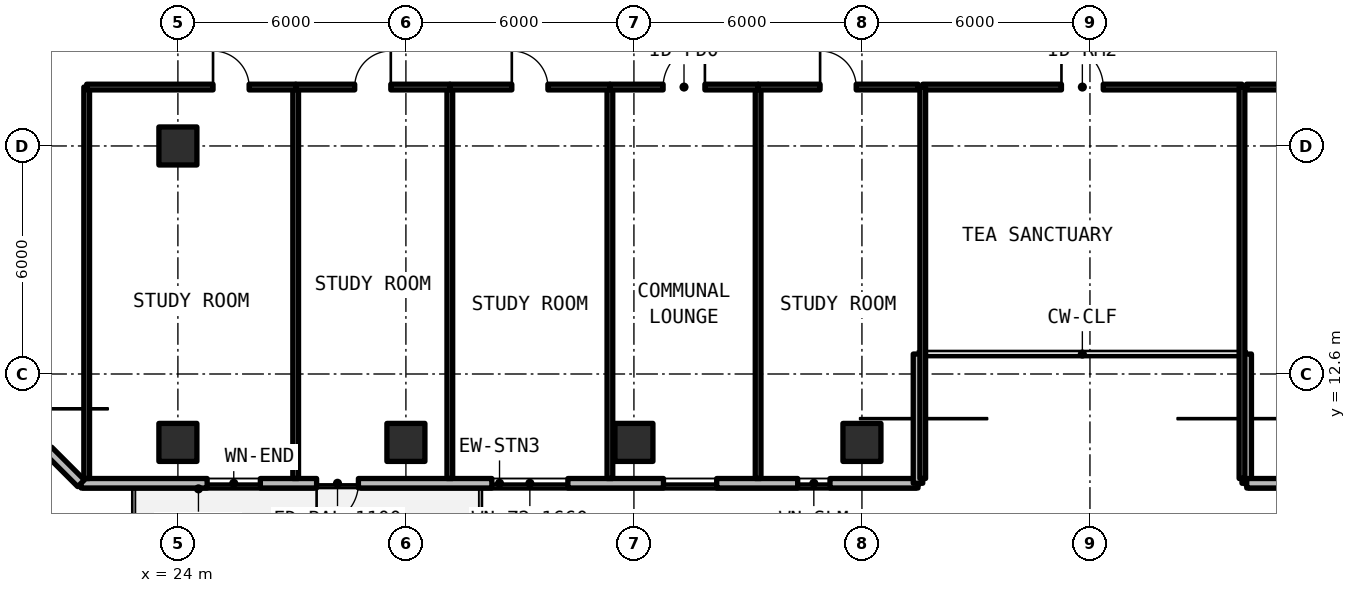
"""IFC4 building model, lengths in metres.
Left out: names, types, materials, properties, quantities, classifications, styles, units other than length and angle.
Written with IfcOpenShell. Run it as: python <this file> out.ifc"""

import sys

from ifc_helpers import new_model, si_unit, direction, frame, frame_2d, origin, origin_2d, place, context, subcontext, project, spatial, rectangle, extrude, element, fill, save


model = new_model("IFC4")
c1 = context("Model", 3, precision=1e-05, world=origin(), true_north=direction((0.0, 1.0)))
c2 = subcontext(c1, "Body", "Model", "MODEL_VIEW")
j1 = project(units=[si_unit("LENGTHUNIT", "METRE"), si_unit("PLANEANGLEUNIT", "RADIAN")], contexts=[c1])
p1 = place(None, origin())
s1 = spatial("IfcSite", under=j1, at=p1, CompositionType="ELEMENT")
p2 = place(p1, origin())
s2 = spatial("IfcBuilding", under=s1, at=p2, CompositionType="ELEMENT")
p3 = place(p2, frame((0.0, 0.0, 98.67)))
s3 = spatial("IfcBuildingStorey", under=s2, at=p3, CompositionType="ELEMENT", Elevation=98.67)
for number, where, z_axis, x_axis in (
    (1, (24.0, 18.6, 0.0), (0.0, 0.0, 1.0), (1.0, 0.0, 0.0)),
    (2, (24.0, 10.8, 0.0), (0.0, 0.0, 1.0), (1.0, 0.0, 0.0)),
    (3, (30.0, 10.8, 0.0), (0.0, 0.0, 1.0), (1.0, 0.0, 0.0)),
    (4, (36.0, 10.8, 0.0), (0.0, 0.0, 1.0), (1.0, 0.0, 0.0)),
    (5, (42.0, 10.8, 0.0), (0.0, 0.0, 1.0), (1.0, 0.0, 0.0)),
):
    element("IfcColumn", number, at=place(p3, frame(where, z_axis=z_axis, x_axis=x_axis)), inside=s3, PredefinedType="COLUMN", context=c2, shape_type="SweptSolid", body=[
        extrude(rectangle(XDim=1.0, YDim=1.0, at=origin_2d()), origin(), (0.0, 0.0, 1.0), 3.3),
    ])
p4 = place(p3, frame((21.452, 9.725, 0.0), z_axis=(0.0, 0.0, 1.0), x_axis=(1.0, 0.0, 0.0)))
e6 = element("IfcWall", 6, at=p4, inside=s3, PredefinedType="SOLIDWALL", context=c2, shape_type="SweptSolid", body=[
    extrude(rectangle(XDim=22.023, YDim=0.25, at=frame_2d((11.012, 0.0))), origin(), (0.0, 0.0, 1.0), 3.08),
])
p5 = place(p4, frame((6.198, 0.0, 0.0)))
e7 = element("IfcOpeningElement", 7, at=p5, cuts=e6, PredefinedType="OPENING", context=c2, shape_type="SweptSolid", body=[
    extrude(rectangle(XDim=1.1, YDim=2.15, at=frame_2d((0.55, 1.075))), frame((0.0, 0.135, 0.0), z_axis=(0.0, -1.0, 0.0), x_axis=(1.0, 0.0, 0.0)), (0.0, 0.0, 1.0), 0.27),
])
p6 = place(p4, frame((3.318, 0.0, 0.78)))
e8 = element("IfcOpeningElement", 8, at=p6, cuts=e6, PredefinedType="OPENING", context=c2, shape_type="SweptSolid", body=[
    extrude(rectangle(XDim=1.4, YDim=1.65, at=frame_2d((0.7, 0.825))), frame((0.0, 0.135, 0.0), z_axis=(0.0, -1.0, 0.0), x_axis=(1.0, 0.0, 0.0)), (0.0, 0.0, 1.0), 0.27),
])
p7 = place(p4, frame((10.81, 0.0, 0.78)))
e9 = element("IfcOpeningElement", 9, at=p7, cuts=e6, PredefinedType="OPENING", context=c2, shape_type="SweptSolid", body=[
    extrude(rectangle(XDim=2.0, YDim=1.66, at=frame_2d((1.0, 0.83))), frame((0.0, 0.135, 0.0), z_axis=(0.0, -1.0, 0.0), x_axis=(1.0, 0.0, 0.0)), (0.0, 0.0, 1.0), 0.27),
])
p8 = place(p4, frame((15.326, 0.0, 0.78)))
e10 = element("IfcOpeningElement", 10, at=p8, cuts=e6, PredefinedType="OPENING", context=c2, shape_type="SweptSolid", body=[
    extrude(rectangle(XDim=1.4, YDim=1.65, at=frame_2d((0.7, 0.825))), frame((0.0, 0.135, 0.0), z_axis=(0.0, -1.0, 0.0), x_axis=(1.0, 0.0, 0.0)), (0.0, 0.0, 1.0), 0.27),
])
p9 = place(p4, frame((18.857, 0.0, 0.78)))
e11 = element("IfcOpeningElement", 11, at=p9, cuts=e6, PredefinedType="OPENING", context=c2, shape_type="SweptSolid", body=[
    extrude(rectangle(XDim=0.85, YDim=1.65, at=frame_2d((0.425, 0.825))), frame((0.0, 0.135, 0.0), z_axis=(0.0, -1.0, 0.0), x_axis=(1.0, 0.0, 0.0)), (0.0, 0.0, 1.0), 0.27),
])
for number, where, z_axis, x_axis in (
    (12, (43.475, 9.725, 0.0), (0.0, 0.0, 1.0), (0.0, 1.0, 0.0)),
    (13, (52.125, 13.125, 0.0), (0.0, 0.0, 1.0), (0.0, -1.0, 0.0)),
):
    element("IfcWall", number, at=place(p3, frame(where, z_axis=z_axis, x_axis=x_axis)), inside=s3, PredefinedType="SOLIDWALL", context=c2, shape_type="SweptSolid", body=[
        extrude(rectangle(XDim=3.4, YDim=0.25, at=frame_2d((1.7, 0.0))), origin(), (0.0, 0.0, 1.0), 3.08),
    ])
p10 = place(p3, frame((52.125, 9.725, 0.0), z_axis=(0.0, 0.0, 1.0), x_axis=(1.0, 0.0, 0.0)))
e14 = element("IfcWall", 14, at=p10, inside=s3, PredefinedType="SOLIDWALL", context=c2, shape_type="SweptSolid", body=[
    extrude(rectangle(XDim=44.023, YDim=0.25, at=frame_2d((22.012, 0.0))), origin(), (0.0, 0.0, 1.0), 3.08),
])
p11 = place(p10, frame((10.525, 0.0, 0.0)))
e15 = element("IfcOpeningElement", 15, at=p11, cuts=e14, PredefinedType="OPENING", context=c2, shape_type="SweptSolid", body=[
    extrude(rectangle(XDim=1.1, YDim=2.15, at=frame_2d((0.55, 1.075))), frame((0.0, 0.135, 0.0), z_axis=(0.0, -1.0, 0.0), x_axis=(1.0, 0.0, 0.0)), (0.0, 0.0, 1.0), 0.27),
])
p12 = place(p10, frame((22.125, 0.0, 0.0)))
e16 = element("IfcOpeningElement", 16, at=p12, cuts=e14, PredefinedType="OPENING", context=c2, shape_type="SweptSolid", body=[
    extrude(rectangle(XDim=1.1, YDim=2.15, at=frame_2d((0.55, 1.075))), frame((0.0, 0.135, 0.0), z_axis=(0.0, -1.0, 0.0), x_axis=(1.0, 0.0, 0.0)), (0.0, 0.0, 1.0), 0.27),
])
p13 = place(p10, frame((34.475, 0.0, 0.0)))
e17 = element("IfcOpeningElement", 17, at=p13, cuts=e14, PredefinedType="OPENING", context=c2, shape_type="SweptSolid", body=[
    extrude(rectangle(XDim=1.1, YDim=2.15, at=frame_2d((0.55, 1.075))), frame((0.0, 0.135, 0.0), z_axis=(0.0, -1.0, 0.0), x_axis=(1.0, 0.0, 0.0)), (0.0, 0.0, 1.0), 0.27),
])
p14 = place(p10, frame((2.669, 0.0, 0.78)))
e18 = element("IfcOpeningElement", 18, at=p14, cuts=e14, PredefinedType="OPENING", context=c2, shape_type="SweptSolid", body=[
    extrude(rectangle(XDim=2.0, YDim=1.66, at=frame_2d((1.0, 0.83))), frame((0.0, 0.135, 0.0), z_axis=(0.0, -1.0, 0.0), x_axis=(1.0, 0.0, 0.0)), (0.0, 0.0, 1.0), 0.27),
])
p15 = place(p10, frame((8.314, 0.0, 0.78)))
e19 = element("IfcOpeningElement", 19, at=p15, cuts=e14, PredefinedType="OPENING", context=c2, shape_type="SweptSolid", body=[
    extrude(rectangle(XDim=0.85, YDim=1.65, at=frame_2d((0.425, 0.825))), frame((0.0, 0.135, 0.0), z_axis=(0.0, -1.0, 0.0), x_axis=(1.0, 0.0, 0.0)), (0.0, 0.0, 1.0), 0.27),
])
p16 = place(p10, frame((15.009, 0.0, 0.78)))
e20 = element("IfcOpeningElement", 20, at=p16, cuts=e14, PredefinedType="OPENING", context=c2, shape_type="SweptSolid", body=[
    extrude(rectangle(XDim=0.85, YDim=1.65, at=frame_2d((0.425, 0.825))), frame((0.0, 0.135, 0.0), z_axis=(0.0, -1.0, 0.0), x_axis=(1.0, 0.0, 0.0)), (0.0, 0.0, 1.0), 0.27),
])
p17 = place(p10, frame((17.708, 0.0, 0.78)))
e21 = element("IfcOpeningElement", 21, at=p17, cuts=e14, PredefinedType="OPENING", context=c2, shape_type="SweptSolid", body=[
    extrude(rectangle(XDim=1.4, YDim=1.65, at=frame_2d((0.7, 0.825))), frame((0.0, 0.135, 0.0), z_axis=(0.0, -1.0, 0.0), x_axis=(1.0, 0.0, 0.0)), (0.0, 0.0, 1.0), 0.27),
])
p18 = place(p10, frame((26.714, 0.0, 0.78)))
e22 = element("IfcOpeningElement", 22, at=p18, cuts=e14, PredefinedType="OPENING", context=c2, shape_type="SweptSolid", body=[
    extrude(rectangle(XDim=1.4, YDim=1.65, at=frame_2d((0.7, 0.825))), frame((0.0, 0.135, 0.0), z_axis=(0.0, -1.0, 0.0), x_axis=(1.0, 0.0, 0.0)), (0.0, 0.0, 1.0), 0.27),
])
p19 = place(p10, frame((29.618, 0.0, 0.78)))
e23 = element("IfcOpeningElement", 23, at=p19, cuts=e14, PredefinedType="OPENING", context=c2, shape_type="SweptSolid", body=[
    extrude(rectangle(XDim=1.4, YDim=1.65, at=frame_2d((0.7, 0.825))), frame((0.0, 0.135, 0.0), z_axis=(0.0, -1.0, 0.0), x_axis=(1.0, 0.0, 0.0)), (0.0, 0.0, 1.0), 0.27),
])
p20 = place(p10, frame((39.102, 0.0, 0.78)))
e24 = element("IfcOpeningElement", 24, at=p20, cuts=e14, PredefinedType="OPENING", context=c2, shape_type="SweptSolid", body=[
    extrude(rectangle(XDim=2.0, YDim=1.66, at=frame_2d((1.0, 0.83))), frame((0.0, 0.135, 0.0), z_axis=(0.0, -1.0, 0.0), x_axis=(1.0, 0.0, 0.0)), (0.0, 0.0, 1.0), 0.27),
])
p21 = place(p3, frame((17.325, 13.852, 0.0), z_axis=(0.0, 0.0, 1.0), x_axis=(0.707127696864, -0.70708586489, 0.0)))
e25 = element("IfcWall", 25, at=p21, inside=s3, PredefinedType="SOLIDWALL", context=c2, shape_type="SweptSolid", body=[
    extrude(rectangle(XDim=5.836, YDim=0.25, at=frame_2d((2.918, 0.0))), origin(), (0.0, 0.0, 1.0), 3.08),
])
p22 = place(p21, frame((1.218, 0.0, 0.78)))
e26 = element("IfcOpeningElement", 26, at=p22, cuts=e25, PredefinedType="OPENING", context=c2, shape_type="SweptSolid", body=[
    extrude(rectangle(XDim=3.4, YDim=1.66, at=frame_2d((1.7, 0.83))), frame((0.0, 0.135, 0.0), z_axis=(0.0, -1.0, 0.0), x_axis=(1.0, 0.0, 0.0)), (0.0, 0.0, 1.0), 0.27),
])
p23 = place(p3, frame((43.6, 20.15, 0.0), z_axis=(0.0, 0.0, 1.0), x_axis=(1.0, 0.0, 0.0)))
e27 = element("IfcWall", 27, at=p23, inside=s3, PredefinedType="SOLIDWALL", context=c2, shape_type="SweptSolid", body=[
    extrude(rectangle(XDim=8.4, YDim=0.15, at=frame_2d((4.2, 0.0))), origin(), (0.0, 0.0, 1.0), 2.35),
])
p24 = place(p23, frame((3.65, 0.0, 0.0)))
e28 = element("IfcOpeningElement", 28, at=p24, cuts=e27, PredefinedType="OPENING", context=c2, shape_type="SweptSolid", body=[
    extrude(rectangle(XDim=1.1, YDim=2.15, at=frame_2d((0.55, 1.075))), frame((0.0, 0.085, 0.0), z_axis=(0.0, -1.0, 0.0), x_axis=(1.0, 0.0, 0.0)), (0.0, 0.0, 1.0), 0.17),
])
for number, where, z_axis, x_axis in (
    (29, (43.6, 9.85, 0.0), (0.0, 0.0, 1.0), (0.0, 1.0, 0.0)),
    (30, (52.0, 9.85, 0.0), (0.0, 0.0, 1.0), (0.0, 1.0, 0.0)),
    (31, (21.6, 9.85, 0.0), (0.0, 0.0, 1.0), (0.0, 1.0, 0.0)),
    (32, (27.099, 9.85, 0.0), (0.0, 0.0, 1.0), (0.0, 1.0, 0.0)),
):
    element("IfcWall", number, at=place(p3, frame(where, z_axis=z_axis, x_axis=x_axis)), inside=s3, PredefinedType="SOLIDWALL", context=c2, shape_type="SweptSolid", body=[
        extrude(rectangle(XDim=10.3, YDim=0.15, at=frame_2d((5.15, 0.0))), origin(), (0.0, 0.0, 1.0), 2.35),
    ])
p25 = place(p3, frame((21.6, 20.15, 0.0), z_axis=(0.0, 0.0, 1.0), x_axis=(1.0, 0.0, 0.0)))
e33 = element("IfcWall", 33, at=p25, inside=s3, PredefinedType="SOLIDWALL", context=c2, shape_type="SweptSolid", body=[
    extrude(rectangle(XDim=5.499, YDim=0.15, at=frame_2d((2.75, 0.0))), origin(), (0.0, 0.0, 1.0), 2.35),
])
p26 = place(p25, frame((3.325, 0.0, 0.0)))
e34 = element("IfcOpeningElement", 34, at=p26, cuts=e33, PredefinedType="OPENING", context=c2, shape_type="SweptSolid", body=[
    extrude(rectangle(XDim=0.95, YDim=2.15, at=frame_2d((0.475, 1.075))), frame((0.0, 0.085, 0.0), z_axis=(0.0, -1.0, 0.0), x_axis=(1.0, 0.0, 0.0)), (0.0, 0.0, 1.0), 0.17),
])
p27 = place(p3, frame((31.156, 9.85, 0.0), z_axis=(0.0, 0.0, 1.0), x_axis=(0.0, 1.0, 0.0)))
e35 = element("IfcWall", 35, at=p27, inside=s3, PredefinedType="SOLIDWALL", context=c2, shape_type="SweptSolid", body=[
    extrude(rectangle(XDim=10.3, YDim=0.15, at=frame_2d((5.15, 0.0))), origin(), (0.0, 0.0, 1.0), 2.35),
])
p28 = place(p3, frame((27.099, 20.15, 0.0), z_axis=(0.0, 0.0, 1.0), x_axis=(1.0, 0.0, 0.0)))
e36 = element("IfcWall", 36, at=p28, inside=s3, PredefinedType="SOLIDWALL", context=c2, shape_type="SweptSolid", body=[
    extrude(rectangle(XDim=4.056, YDim=0.15, at=frame_2d((2.028, 0.0))), origin(), (0.0, 0.0, 1.0), 2.35),
])
p29 = place(p28, frame((1.553, 0.0, 0.0)))
e37 = element("IfcOpeningElement", 37, at=p29, cuts=e36, PredefinedType="OPENING", context=c2, shape_type="SweptSolid", body=[
    extrude(rectangle(XDim=0.95, YDim=2.15, at=frame_2d((0.475, 1.075))), frame((0.0, 0.085, 0.0), z_axis=(0.0, -1.0, 0.0), x_axis=(1.0, 0.0, 0.0)), (0.0, 0.0, 1.0), 0.17),
])
p30 = place(p3, frame((35.368, 9.85, 0.0), z_axis=(0.0, 0.0, 1.0), x_axis=(0.0, 1.0, 0.0)))
e38 = element("IfcWall", 38, at=p30, inside=s3, PredefinedType="SOLIDWALL", context=c2, shape_type="SweptSolid", body=[
    extrude(rectangle(XDim=10.3, YDim=0.15, at=frame_2d((5.15, 0.0))), origin(), (0.0, 0.0, 1.0), 2.35),
])
p31 = place(p3, frame((31.156, 20.15, 0.0), z_axis=(0.0, 0.0, 1.0), x_axis=(1.0, 0.0, 0.0)))
e39 = element("IfcWall", 39, at=p31, inside=s3, PredefinedType="SOLIDWALL", context=c2, shape_type="SweptSolid", body=[
    extrude(rectangle(XDim=4.212, YDim=0.15, at=frame_2d((2.106, 0.0))), origin(), (0.0, 0.0, 1.0), 2.35),
])
p32 = place(p31, frame((1.631, 0.0, 0.0)))
e40 = element("IfcOpeningElement", 40, at=p32, cuts=e39, PredefinedType="OPENING", context=c2, shape_type="SweptSolid", body=[
    extrude(rectangle(XDim=0.95, YDim=2.15, at=frame_2d((0.475, 1.075))), frame((0.0, 0.085, 0.0), z_axis=(0.0, -1.0, 0.0), x_axis=(1.0, 0.0, 0.0)), (0.0, 0.0, 1.0), 0.17),
])
p33 = place(p3, frame((39.268, 9.85, 0.0), z_axis=(0.0, 0.0, 1.0), x_axis=(0.0, 1.0, 0.0)))
e41 = element("IfcWall", 41, at=p33, inside=s3, PredefinedType="SOLIDWALL", context=c2, shape_type="SweptSolid", body=[
    extrude(rectangle(XDim=10.3, YDim=0.15, at=frame_2d((5.15, 0.0))), origin(), (0.0, 0.0, 1.0), 2.35),
])
p34 = place(p3, frame((35.368, 20.15, 0.0), z_axis=(0.0, 0.0, 1.0), x_axis=(1.0, 0.0, 0.0)))
e42 = element("IfcWall", 42, at=p34, inside=s3, PredefinedType="SOLIDWALL", context=c2, shape_type="SweptSolid", body=[
    extrude(rectangle(XDim=3.9, YDim=0.15, at=frame_2d((1.95, 0.0))), origin(), (0.0, 0.0, 1.0), 2.35),
])
p35 = place(p34, frame((1.4, 0.0, 0.0)))
e43 = element("IfcOpeningElement", 43, at=p35, cuts=e42, PredefinedType="OPENING", context=c2, shape_type="SweptSolid", body=[
    extrude(rectangle(XDim=1.1, YDim=2.15, at=frame_2d((0.55, 1.075))), frame((0.0, 0.085, 0.0), z_axis=(0.0, -1.0, 0.0), x_axis=(1.0, 0.0, 0.0)), (0.0, 0.0, 1.0), 0.17),
])
p36 = place(p3, frame((39.268, 20.15, 0.0), z_axis=(0.0, 0.0, 1.0), x_axis=(1.0, 0.0, 0.0)))
e44 = element("IfcWall", 44, at=p36, inside=s3, PredefinedType="SOLIDWALL", context=c2, shape_type="SweptSolid", body=[
    extrude(rectangle(XDim=4.212, YDim=0.15, at=frame_2d((2.106, 0.0))), origin(), (0.0, 0.0, 1.0), 2.35),
])
p37 = place(p36, frame((1.631, 0.0, 0.0)))
e45 = element("IfcOpeningElement", 45, at=p37, cuts=e44, PredefinedType="OPENING", context=c2, shape_type="SweptSolid", body=[
    extrude(rectangle(XDim=0.95, YDim=2.15, at=frame_2d((0.475, 1.075))), frame((0.0, 0.085, 0.0), z_axis=(0.0, -1.0, 0.0), x_axis=(1.0, 0.0, 0.0)), (0.0, 0.0, 1.0), 0.17),
])
p38 = place(p3, frame((52.12, 20.15, 0.0), z_axis=(0.0, 0.0, 1.0), x_axis=(1.0, 0.0, 0.0)))
e46 = element("IfcWall", 46, at=p38, inside=s3, PredefinedType="SOLIDWALL", context=c2, shape_type="SweptSolid", body=[
    extrude(rectangle(XDim=6.708, YDim=0.15, at=frame_2d((3.354, 0.0))), origin(), (0.0, 0.0, 1.0), 2.35),
])
p39 = place(p38, frame((2.879, 0.0, 0.0)))
e47 = element("IfcOpeningElement", 47, at=p39, cuts=e46, PredefinedType="OPENING", context=c2, shape_type="SweptSolid", body=[
    extrude(rectangle(XDim=0.95, YDim=2.15, at=frame_2d((0.475, 1.075))), frame((0.0, 0.085, 0.0), z_axis=(0.0, -1.0, 0.0), x_axis=(1.0, 0.0, 0.0)), (0.0, 0.0, 1.0), 0.17),
])
p40 = place(p5, frame((1.1, 0.0, 0.0), z_axis=(0.0, 0.0, 1.0), x_axis=(-1.0, 0.0, 0.0)))
e48 = element("IfcDoor", 48, at=p40, inside=s3, OperationType="SINGLE_SWING_RIGHT", PredefinedType="DOOR", context=c2, shape_type="SweptSolid", body=[
    extrude(rectangle(XDim=1.1, YDim=2.15, at=frame_2d((0.55, 1.075))), frame((0.0, 0.025, 0.0), z_axis=(0.0, -1.0, 0.0), x_axis=(1.0, 0.0, 0.0)), (0.0, 0.0, 1.0), 0.05),
])
fill(e7, e48)
p41 = place(p6, origin())
e49 = element("IfcWindow", 49, at=p41, inside=s3, PartitioningType="SINGLE_PANEL", PredefinedType="WINDOW", context=c2, shape_type="SweptSolid", body=[
    extrude(rectangle(XDim=1.4, YDim=1.65, at=frame_2d((0.7, 0.825))), frame((0.0, 0.03, 0.0), z_axis=(0.0, -1.0, 0.0), x_axis=(1.0, 0.0, 0.0)), (0.0, 0.0, 1.0), 0.06),
])
fill(e8, e49)
p42 = place(p7, origin())
e50 = element("IfcWindow", 50, at=p42, inside=s3, PartitioningType="SINGLE_PANEL", PredefinedType="WINDOW", context=c2, shape_type="SweptSolid", body=[
    extrude(rectangle(XDim=2.0, YDim=1.66, at=frame_2d((1.0, 0.83))), frame((0.0, 0.03, 0.0), z_axis=(0.0, -1.0, 0.0), x_axis=(1.0, 0.0, 0.0)), (0.0, 0.0, 1.0), 0.06),
])
fill(e9, e50)
p43 = place(p8, origin())
e51 = element("IfcWindow", 51, at=p43, inside=s3, PartitioningType="SINGLE_PANEL", PredefinedType="WINDOW", context=c2, shape_type="SweptSolid", body=[
    extrude(rectangle(XDim=1.4, YDim=1.65, at=frame_2d((0.7, 0.825))), frame((0.0, 0.03, 0.0), z_axis=(0.0, -1.0, 0.0), x_axis=(1.0, 0.0, 0.0)), (0.0, 0.0, 1.0), 0.06),
])
fill(e10, e51)
p44 = place(p9, origin())
e52 = element("IfcWindow", 52, at=p44, inside=s3, PartitioningType="SINGLE_PANEL", PredefinedType="WINDOW", context=c2, shape_type="SweptSolid", body=[
    extrude(rectangle(XDim=0.85, YDim=1.65, at=frame_2d((0.425, 0.825))), frame((0.0, 0.03, 0.0), z_axis=(0.0, -1.0, 0.0), x_axis=(1.0, 0.0, 0.0)), (0.0, 0.0, 1.0), 0.06),
])
fill(e11, e52)
p45 = place(p24, origin())
e53 = element("IfcDoor", 53, at=p45, inside=s3, OperationType="SINGLE_SWING_LEFT", PredefinedType="DOOR", context=c2, shape_type="SweptSolid", body=[
    extrude(rectangle(XDim=1.1, YDim=2.15, at=frame_2d((0.55, 1.075))), frame((0.0, 0.025, 0.0), z_axis=(0.0, -1.0, 0.0), x_axis=(1.0, 0.0, 0.0)), (0.0, 0.0, 1.0), 0.05),
])
fill(e28, e53)
p46 = place(p26, origin())
e54 = element("IfcDoor", 54, at=p46, inside=s3, OperationType="SINGLE_SWING_LEFT", PredefinedType="DOOR", context=c2, shape_type="SweptSolid", body=[
    extrude(rectangle(XDim=0.95, YDim=2.15, at=frame_2d((0.475, 1.075))), frame((0.0, 0.025, 0.0), z_axis=(0.0, -1.0, 0.0), x_axis=(1.0, 0.0, 0.0)), (0.0, 0.0, 1.0), 0.05),
])
fill(e34, e54)
p47 = place(p29, origin())
e55 = element("IfcDoor", 55, at=p47, inside=s3, OperationType="SINGLE_SWING_RIGHT", PredefinedType="DOOR", context=c2, shape_type="SweptSolid", body=[
    extrude(rectangle(XDim=0.95, YDim=2.15, at=frame_2d((0.475, 1.075))), frame((0.0, 0.025, 0.0), z_axis=(0.0, -1.0, 0.0), x_axis=(1.0, 0.0, 0.0)), (0.0, 0.0, 1.0), 0.05),
])
fill(e37, e55)
p48 = place(p32, origin())
e56 = element("IfcDoor", 56, at=p48, inside=s3, OperationType="SINGLE_SWING_LEFT", PredefinedType="DOOR", context=c2, shape_type="SweptSolid", body=[
    extrude(rectangle(XDim=0.95, YDim=2.15, at=frame_2d((0.475, 1.075))), frame((0.0, 0.025, 0.0), z_axis=(0.0, -1.0, 0.0), x_axis=(1.0, 0.0, 0.0)), (0.0, 0.0, 1.0), 0.05),
])
fill(e40, e56)
p49 = place(p35, origin())
e57 = element("IfcDoor", 57, at=p49, inside=s3, OperationType="SINGLE_SWING_RIGHT", PredefinedType="DOOR", context=c2, shape_type="SweptSolid", body=[
    extrude(rectangle(XDim=1.1, YDim=2.15, at=frame_2d((0.55, 1.075))), frame((0.0, 0.025, 0.0), z_axis=(0.0, -1.0, 0.0), x_axis=(1.0, 0.0, 0.0)), (0.0, 0.0, 1.0), 0.05),
])
fill(e43, e57)
p50 = place(p37, origin())
e58 = element("IfcDoor", 58, at=p50, inside=s3, OperationType="SINGLE_SWING_LEFT", PredefinedType="DOOR", context=c2, shape_type="SweptSolid", body=[
    extrude(rectangle(XDim=0.95, YDim=2.15, at=frame_2d((0.475, 1.075))), frame((0.0, 0.025, 0.0), z_axis=(0.0, -1.0, 0.0), x_axis=(1.0, 0.0, 0.0)), (0.0, 0.0, 1.0), 0.05),
])
fill(e45, e58)
save(model, sys.argv[1])
